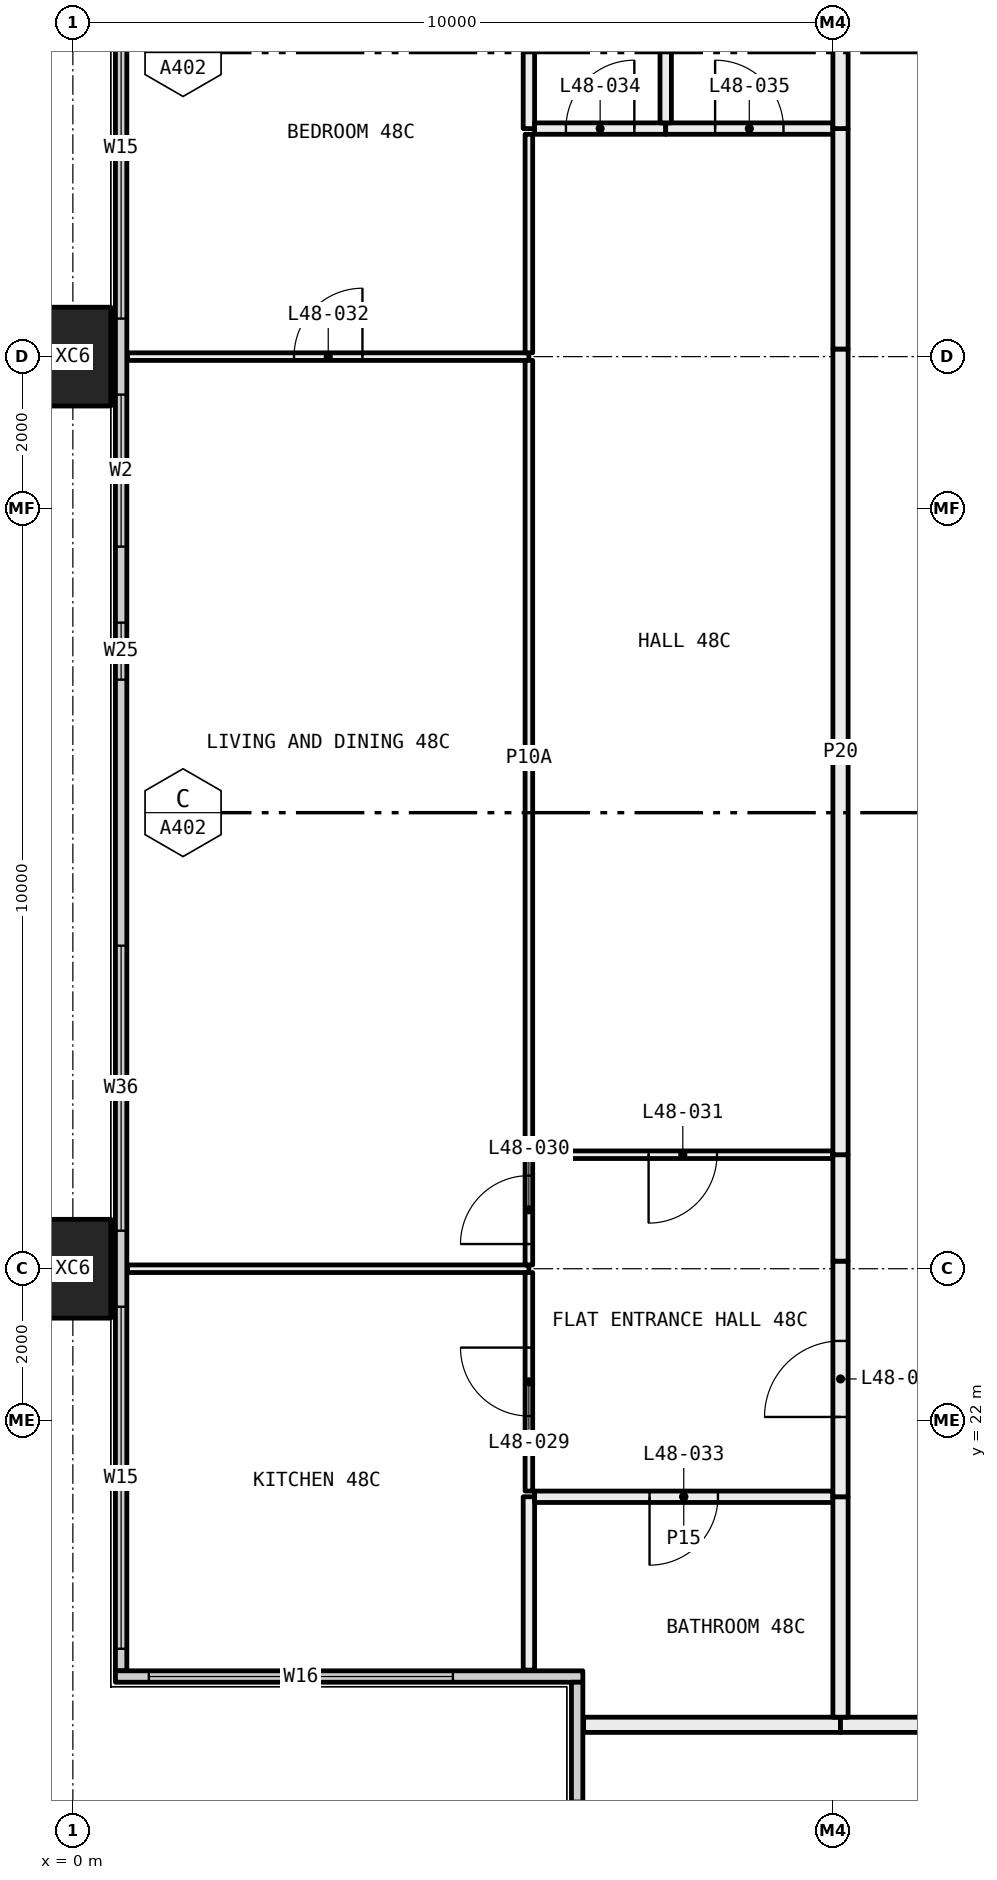
"""IFC4 building model, lengths in metres.
Left out: names, types, materials, properties, quantities, classifications, styles, units other than length and angle.
Written with IfcOpenShell. Run it as: python <this file> out.ifc"""

import sys

from ifc_helpers import new_model, si_unit, direction, frame, frame_2d, origin, origin_2d, place, context, subcontext, project, spatial, rectangle, hollow_rectangle, extrude, element, fill, save


model = new_model("IFC4")
c1 = context("Model", 3, precision=1e-05, world=origin(), true_north=direction((0.0, 1.0)))
c2 = subcontext(c1, "Body", "Model", "MODEL_VIEW")
j1 = project(units=[si_unit("LENGTHUNIT", "METRE"), si_unit("PLANEANGLEUNIT", "RADIAN")], contexts=[c1])
p1 = place(None, origin())
s1 = spatial("IfcSite", under=j1, at=p1, CompositionType="ELEMENT")
p2 = place(p1, origin())
s2 = spatial("IfcBuilding", under=s1, at=p2, CompositionType="ELEMENT")
p3 = place(p2, frame((0.0, 0.0, 182.4)))
s3 = spatial("IfcBuildingStorey", under=s2, at=p3, CompositionType="ELEMENT", Elevation=182.4)
for number, where, z_axis, x_axis in (
    (1, (0.0, 24.0, -0.4), (0.0, 0.0, 1.0), (0.0, 1.0, 0.0)),
    (2, (0.0, 36.0, -0.4), (0.0, 0.0, 1.0), (0.0, 1.0, 0.0)),
):
    element("IfcColumn", number, at=place(p3, frame(where, z_axis=z_axis, x_axis=x_axis)), inside=s3, PredefinedType="COLUMN", context=c2, shape_type="SweptSolid", body=[
        extrude(hollow_rectangle(XDim=1.3, YDim=1.0, WallThickness=0.05, at=origin_2d()), origin(), (0.0, 0.0, 1.0), 3.45),
    ])
p4 = place(p3, frame((0.635, 18.71, 0.0), z_axis=(0.0, 0.0, 1.0), x_axis=(0.0, 1.0, 0.0)))
e3 = element("IfcWall", 3, at=p4, inside=s3, PredefinedType="ELEMENTEDWALL", context=c2, shape_type="SweptSolid", body=[
    extrude(rectangle(XDim=22.58, YDim=0.15, at=frame_2d((11.29, 0.0))), origin(), (0.0, 0.0, 1.0), 3.05),
])
p5 = place(p4, frame((0.29, 0.0, 0.45)))
e4 = element("IfcOpeningElement", 4, at=p5, cuts=e3, PredefinedType="OPENING", context=c2, shape_type="SweptSolid", body=[
    extrude(rectangle(XDim=4.5, YDim=2.55, at=frame_2d((2.25, 1.275))), frame((0.0, 0.085, 0.0), z_axis=(0.0, -1.0, 0.0), x_axis=(1.0, 0.0, 0.0)), (0.0, 0.0, 1.0), 0.17),
])
p6 = place(p4, frame((5.79, 0.0, 0.45)))
e5 = element("IfcOpeningElement", 5, at=p6, cuts=e3, PredefinedType="OPENING", context=c2, shape_type="SweptSolid", body=[
    extrude(rectangle(XDim=3.75, YDim=2.55, at=frame_2d((1.875, 1.275))), frame((0.0, 0.085, 0.0), z_axis=(0.0, -1.0, 0.0), x_axis=(1.0, 0.0, 0.0)), (0.0, 0.0, 1.0), 0.17),
])
p7 = place(p4, frame((13.04, 0.0, 0.45)))
e6 = element("IfcOpeningElement", 6, at=p7, cuts=e3, PredefinedType="OPENING", context=c2, shape_type="SweptSolid", body=[
    extrude(rectangle(XDim=0.75, YDim=2.55, at=frame_2d((0.375, 1.275))), frame((0.0, 0.085, 0.0), z_axis=(0.0, -1.0, 0.0), x_axis=(1.0, 0.0, 0.0)), (0.0, 0.0, 1.0), 0.17),
])
p8 = place(p4, frame((14.79, 0.0, 0.45)))
e7 = element("IfcOpeningElement", 7, at=p8, cuts=e3, PredefinedType="OPENING", context=c2, shape_type="SweptSolid", body=[
    extrude(rectangle(XDim=2.0, YDim=2.55, at=frame_2d((1.0, 1.275))), frame((0.0, 0.085, 0.0), z_axis=(0.0, -1.0, 0.0), x_axis=(1.0, 0.0, 0.0)), (0.0, 0.0, 1.0), 0.17),
])
p9 = place(p4, frame((17.79, 0.0, 0.45)))
e8 = element("IfcOpeningElement", 8, at=p9, cuts=e3, PredefinedType="OPENING", context=c2, shape_type="SweptSolid", body=[
    extrude(rectangle(XDim=4.5, YDim=2.55, at=frame_2d((2.25, 1.275))), frame((0.0, 0.085, 0.0), z_axis=(0.0, -1.0, 0.0), x_axis=(1.0, 0.0, 0.0)), (0.0, 0.0, 1.0), 0.17),
])
p10 = place(p3, frame((0.56, 18.635, 0.0), z_axis=(0.0, 0.0, 1.0), x_axis=(1.0, 0.0, 0.0)))
e9 = element("IfcWall", 9, at=p10, inside=s3, PredefinedType="ELEMENTEDWALL", context=c2, shape_type="SweptSolid", body=[
    extrude(rectangle(XDim=6.15, YDim=0.15, at=frame_2d((3.075, 0.0))), origin(), (0.0, 0.0, 1.0), 3.05),
])
p11 = place(p10, frame((0.44, 0.0, 0.45)))
e10 = element("IfcOpeningElement", 10, at=p11, cuts=e9, PredefinedType="OPENING", context=c2, shape_type="SweptSolid", body=[
    extrude(rectangle(XDim=4.0, YDim=2.55, at=frame_2d((2.0, 1.275))), frame((0.0, 0.085, 0.0), z_axis=(0.0, -1.0, 0.0), x_axis=(1.0, 0.0, 0.0)), (0.0, 0.0, 1.0), 0.17),
])
p12 = place(p3, frame((6.635, 12.71, 0.0), z_axis=(0.0, 0.0, 1.0), x_axis=(0.0, 1.0, 0.0)))
e11 = element("IfcWall", 11, at=p12, inside=s3, PredefinedType="ELEMENTEDWALL", context=c2, shape_type="SweptSolid", body=[
    extrude(rectangle(XDim=5.85, YDim=0.15, at=frame_2d((2.925, 0.0))), origin(), (0.0, 0.0, 1.0), 3.05),
])
p13 = place(p12, frame((0.29, 0.0, 0.45)))
e12 = element("IfcOpeningElement", 12, at=p13, cuts=e11, PredefinedType="OPENING", context=c2, shape_type="SweptSolid", body=[
    extrude(rectangle(XDim=4.0, YDim=2.55, at=frame_2d((2.0, 1.275))), frame((0.0, 0.085, 0.0), z_axis=(0.0, -1.0, 0.0), x_axis=(1.0, 0.0, 0.0)), (0.0, 0.0, 1.0), 0.17),
])
p14 = place(p3, frame((10.1, 18.0, 0.0), z_axis=(0.0, 0.0, 1.0), x_axis=(-1.0, 0.0, 0.0)))
e13 = element("IfcWall", 13, at=p14, inside=s3, PredefinedType="PARTITIONING", context=c2, shape_type="SweptSolid", body=[
    extrude(rectangle(XDim=3.38, YDim=0.2, at=frame_2d((1.69, 0.0))), origin(), (0.0, 0.0, 1.0), 3.05),
])
p15 = place(p3, frame((12.0, 18.0, 0.0), z_axis=(0.0, 0.0, 1.0), x_axis=(-1.0, 0.0, 0.0)))
e14 = element("IfcWall", 14, at=p15, inside=s3, PredefinedType="PARTITIONING", context=c2, shape_type="SweptSolid", body=[
    extrude(rectangle(XDim=1.9, YDim=0.2, at=frame_2d((0.95, 0.0))), origin(), (0.0, 0.0, 1.0), 3.05),
])
p16 = place(p3, frame((6.0, 24.0, 0.0), z_axis=(0.0, 0.0, 1.0), x_axis=(-1.0, 0.0, 0.0)))
e15 = element("IfcWall", 15, at=p16, inside=s3, PredefinedType="PARTITIONING", context=c2, shape_type="SweptSolid", body=[
    extrude(rectangle(XDim=5.28, YDim=0.1, at=frame_2d((2.64, 0.0))), origin(), (0.0, 0.0, 1.0), 2.45),
])
p17 = place(p3, frame((6.0, 18.72, 0.0), z_axis=(0.0, 0.0, 1.0), x_axis=(0.0, 1.0, 0.0)))
e16 = element("IfcWall", 16, at=p17, inside=s3, PredefinedType="PARTITIONING", context=c2, shape_type="SweptSolid", body=[
    extrude(rectangle(XDim=2.28, YDim=0.15, at=frame_2d((1.14, 0.0))), origin(), (0.0, 0.0, 1.0), 3.05),
])
p18 = place(p3, frame((6.0, 21.075, 0.0), z_axis=(0.0, 0.0, 1.0), x_axis=(0.0, 1.0, 0.0)))
e17 = element("IfcWall", 17, at=p18, inside=s3, PredefinedType="PARTITIONING", context=c2, shape_type="SweptSolid", body=[
    extrude(rectangle(XDim=2.875, YDim=0.1, at=frame_2d((1.438, 0.0))), origin(), (0.0, 0.0, 1.0), 2.45),
])
p19 = place(p18, frame((0.988, 0.0, 0.0)))
e18 = element("IfcOpeningElement", 18, at=p19, cuts=e17, PredefinedType="OPENING", context=c2, shape_type="SweptSolid", body=[
    extrude(rectangle(XDim=0.9, YDim=2.1, at=frame_2d((0.45, 1.05))), frame((0.0, 0.06, 0.0), z_axis=(0.0, -1.0, 0.0), x_axis=(1.0, 0.0, 0.0)), (0.0, 0.0, 1.0), 0.12),
])
p20 = place(p3, frame((6.0, 36.0, 0.0), z_axis=(0.0, 0.0, 1.0), x_axis=(-1.0, 0.0, 0.0)))
e19 = element("IfcWall", 19, at=p20, inside=s3, PredefinedType="PARTITIONING", context=c2, shape_type="SweptSolid", body=[
    extrude(rectangle(XDim=5.28, YDim=0.1, at=frame_2d((2.64, 0.0))), origin(), (0.0, 0.0, 1.0), 2.45),
])
p21 = place(p20, frame((2.19, 0.0, 0.0)))
e20 = element("IfcOpeningElement", 20, at=p21, cuts=e19, PredefinedType="OPENING", context=c2, shape_type="SweptSolid", body=[
    extrude(rectangle(XDim=0.9, YDim=2.1, at=frame_2d((0.45, 1.05))), frame((0.0, 0.06, 0.0), z_axis=(0.0, -1.0, 0.0), x_axis=(1.0, 0.0, 0.0)), (0.0, 0.0, 1.0), 0.12),
])
p22 = place(p3, frame((6.0, 24.05, 0.0), z_axis=(0.0, 0.0, 1.0), x_axis=(0.0, 1.0, 0.0)))
e21 = element("IfcWall", 21, at=p22, inside=s3, PredefinedType="PARTITIONING", context=c2, shape_type="SweptSolid", body=[
    extrude(rectangle(XDim=1.45, YDim=0.1, at=frame_2d((0.725, 0.0))), origin(), (0.0, 0.0, 1.0), 2.45),
])
p23 = place(p22, frame((0.275, 0.0, 0.0)))
e22 = element("IfcOpeningElement", 22, at=p23, cuts=e21, PredefinedType="OPENING", context=c2, shape_type="SweptSolid", body=[
    extrude(rectangle(XDim=0.9, YDim=2.1, at=frame_2d((0.45, 1.05))), frame((0.0, 0.06, 0.0), z_axis=(0.0, -1.0, 0.0), x_axis=(1.0, 0.0, 0.0)), (0.0, 0.0, 1.0), 0.12),
])
p24 = place(p3, frame((6.0, 25.5, 0.0), z_axis=(0.0, 0.0, 1.0), x_axis=(0.0, 1.0, 0.0)))
e23 = element("IfcWall", 23, at=p24, inside=s3, PredefinedType="PARTITIONING", context=c2, shape_type="SweptSolid", body=[
    extrude(rectangle(XDim=10.45, YDim=0.1, at=frame_2d((5.225, 0.0))), origin(), (0.0, 0.0, 1.0), 2.45),
])
p25 = place(p3, frame((6.0, 36.05, 0.0), z_axis=(0.0, 0.0, 1.0), x_axis=(0.0, 1.0, 0.0)))
e24 = element("IfcWall", 24, at=p25, inside=s3, PredefinedType="PARTITIONING", context=c2, shape_type="SweptSolid", body=[
    extrude(rectangle(XDim=2.875, YDim=0.1, at=frame_2d((1.438, 0.0))), origin(), (0.0, 0.0, 1.0), 2.45),
])
p26 = place(p3, frame((6.0, 39.0, 0.0), z_axis=(0.0, 0.0, 1.0), x_axis=(0.0, 1.0, 0.0)))
e25 = element("IfcWall", 25, at=p26, inside=s3, PredefinedType="PARTITIONING", context=c2, shape_type="SweptSolid", body=[
    extrude(rectangle(XDim=2.28, YDim=0.15, at=frame_2d((1.14, 0.0))), origin(), (0.0, 0.0, 1.0), 3.05),
])
p27 = place(p3, frame((10.0, 21.0, 0.0), z_axis=(0.0, 0.0, 1.0), x_axis=(-1.0, 0.0, 0.0)))
e26 = element("IfcWall", 26, at=p27, inside=s3, PredefinedType="PARTITIONING", context=c2, shape_type="SweptSolid", body=[
    extrude(rectangle(XDim=3.925, YDim=0.15, at=frame_2d((1.962, 0.0))), origin(), (0.0, 0.0, 1.0), 3.05),
])
p28 = place(p27, frame((1.512, 0.0, 0.0)))
e27 = element("IfcOpeningElement", 27, at=p28, cuts=e26, PredefinedType="OPENING", context=c2, shape_type="SweptSolid", body=[
    extrude(rectangle(XDim=0.9, YDim=2.1, at=frame_2d((0.45, 1.05))), frame((0.0, 0.085, 0.0), z_axis=(0.0, -1.0, 0.0), x_axis=(1.0, 0.0, 0.0)), (0.0, 0.0, 1.0), 0.17),
])
p29 = place(p3, frame((10.1, 18.1, 0.0), z_axis=(0.0, 0.0, 1.0), x_axis=(0.0, 1.0, 0.0)))
e28 = element("IfcWall", 28, at=p29, inside=s3, PredefinedType="PARTITIONING", context=c2, shape_type="SweptSolid", body=[
    extrude(rectangle(XDim=2.9, YDim=0.2, at=frame_2d((1.45, 0.0))), origin(), (0.0, 0.0, 1.0), 3.05),
])
p30 = place(p3, frame((10.0, 25.5, 0.0), z_axis=(0.0, 0.0, 1.0), x_axis=(-1.0, 0.0, 0.0)))
e29 = element("IfcWall", 29, at=p30, inside=s3, PredefinedType="PARTITIONING", context=c2, shape_type="SweptSolid", body=[
    extrude(rectangle(XDim=3.95, YDim=0.1, at=frame_2d((1.975, 0.0))), origin(), (0.0, 0.0, 1.0), 3.05),
])
p31 = place(p30, frame((1.525, 0.0, 0.0)))
e30 = element("IfcOpeningElement", 30, at=p31, cuts=e29, PredefinedType="OPENING", context=c2, shape_type="SweptSolid", body=[
    extrude(rectangle(XDim=0.9, YDim=2.1, at=frame_2d((0.45, 1.05))), frame((0.0, 0.06, 0.0), z_axis=(0.0, -1.0, 0.0), x_axis=(1.0, 0.0, 0.0)), (0.0, 0.0, 1.0), 0.12),
])
p32 = place(p3, frame((10.1, 21.0, 0.0), z_axis=(0.0, 0.0, 1.0), x_axis=(0.0, 1.0, 0.0)))
e31 = element("IfcWall", 31, at=p32, inside=s3, PredefinedType="PARTITIONING", context=c2, shape_type="SweptSolid", body=[
    extrude(rectangle(XDim=3.1, YDim=0.2, at=frame_2d((1.55, 0.0))), origin(), (0.0, 0.0, 1.0), 2.45),
])
p33 = place(p32, frame((1.05, 0.0, 0.0)))
e32 = element("IfcOpeningElement", 32, at=p33, cuts=e31, PredefinedType="OPENING", context=c2, shape_type="SweptSolid", body=[
    extrude(rectangle(XDim=1.0, YDim=2.1, at=frame_2d((0.5, 1.05))), frame((0.0, 0.11, 0.0), z_axis=(0.0, -1.0, 0.0), x_axis=(1.0, 0.0, 0.0)), (0.0, 0.0, 1.0), 0.22),
])
p34 = place(p3, frame((10.1, 24.1, 0.0), z_axis=(0.0, 0.0, 1.0), x_axis=(0.0, 1.0, 0.0)))
e33 = element("IfcWall", 33, at=p34, inside=s3, PredefinedType="PARTITIONING", context=c2, shape_type="SweptSolid", body=[
    extrude(rectangle(XDim=1.4, YDim=0.2, at=frame_2d((0.7, 0.0))), origin(), (0.0, 0.0, 1.0), 3.05),
])
p35 = place(p3, frame((7.8, 39.0, 0.0), z_axis=(0.0, 0.0, 1.0), x_axis=(-1.0, 0.0, 0.0)))
e34 = element("IfcWall", 34, at=p35, inside=s3, PredefinedType="PARTITIONING", context=c2, shape_type="SweptSolid", body=[
    extrude(rectangle(XDim=1.725, YDim=0.15, at=frame_2d((0.863, 0.0))), origin(), (0.0, 0.0, 1.0), 3.05),
])
p36 = place(p35, frame((0.413, 0.0, 0.0)))
e35 = element("IfcOpeningElement", 35, at=p36, cuts=e34, PredefinedType="OPENING", context=c2, shape_type="SweptSolid", body=[
    extrude(rectangle(XDim=0.9, YDim=2.1, at=frame_2d((0.45, 1.05))), frame((0.0, 0.085, 0.0), z_axis=(0.0, -1.0, 0.0), x_axis=(1.0, 0.0, 0.0)), (0.0, 0.0, 1.0), 0.17),
])
p37 = place(p3, frame((10.0, 39.0, 0.0), z_axis=(0.0, 0.0, 1.0), x_axis=(-1.0, 0.0, 0.0)))
e36 = element("IfcWall", 36, at=p37, inside=s3, PredefinedType="PARTITIONING", context=c2, shape_type="SweptSolid", body=[
    extrude(rectangle(XDim=2.2, YDim=0.15, at=frame_2d((1.1, 0.0))), origin(), (0.0, 0.0, 1.0), 3.05),
])
p38 = place(p37, frame((0.65, 0.0, 0.0)))
e37 = element("IfcOpeningElement", 37, at=p38, cuts=e36, PredefinedType="OPENING", context=c2, shape_type="SweptSolid", body=[
    extrude(rectangle(XDim=0.9, YDim=2.1, at=frame_2d((0.45, 1.05))), frame((0.0, 0.085, 0.0), z_axis=(0.0, -1.0, 0.0), x_axis=(1.0, 0.0, 0.0)), (0.0, 0.0, 1.0), 0.17),
])
p39 = place(p3, frame((10.1, 25.5, 0.0), z_axis=(0.0, 0.0, 1.0), x_axis=(0.0, 1.0, 0.0)))
e38 = element("IfcWall", 38, at=p39, inside=s3, PredefinedType="PARTITIONING", context=c2, shape_type="SweptSolid", body=[
    extrude(rectangle(XDim=10.6, YDim=0.2, at=frame_2d((5.3, 0.0))), origin(), (0.0, 0.0, 1.0), 2.45),
])
p40 = place(p3, frame((10.1, 36.1, 0.0), z_axis=(0.0, 0.0, 1.0), x_axis=(0.0, 1.0, 0.0)))
e39 = element("IfcWall", 39, at=p40, inside=s3, PredefinedType="PARTITIONING", context=c2, shape_type="SweptSolid", body=[
    extrude(rectangle(XDim=2.9, YDim=0.2, at=frame_2d((1.45, 0.0))), origin(), (0.0, 0.0, 1.0), 3.05),
])
p41 = place(p3, frame((7.8, 39.075, 0.0), z_axis=(0.0, 0.0, 1.0), x_axis=(0.0, 1.0, 0.0)))
e40 = element("IfcWall", 40, at=p41, inside=s3, PredefinedType="PARTITIONING", context=c2, shape_type="SweptSolid", body=[
    extrude(rectangle(XDim=2.825, YDim=0.15, at=frame_2d((1.413, 0.0))), origin(), (0.0, 0.0, 1.0), 3.05),
])
p42 = place(p3, frame((10.1, 39.0, 0.0), z_axis=(0.0, 0.0, 1.0), x_axis=(0.0, 1.0, 0.0)))
e41 = element("IfcWall", 41, at=p42, inside=s3, PredefinedType="PARTITIONING", context=c2, shape_type="SweptSolid", body=[
    extrude(rectangle(XDim=2.9, YDim=0.2, at=frame_2d((1.45, 0.0))), origin(), (0.0, 0.0, 1.0), 3.05),
])
p43 = place(p5, origin())
e42 = element("IfcWindow", 42, at=p43, inside=s3, PartitioningType="SINGLE_PANEL", PredefinedType="WINDOW", context=c2, shape_type="SweptSolid", body=[
    extrude(rectangle(XDim=4.5, YDim=2.55, at=frame_2d((2.25, 1.275))), frame((0.0, 0.03, 0.0), z_axis=(0.0, -1.0, 0.0), x_axis=(1.0, 0.0, 0.0)), (0.0, 0.0, 1.0), 0.06),
])
fill(e4, e42)
p44 = place(p6, origin())
e43 = element("IfcWindow", 43, at=p44, inside=s3, PartitioningType="SINGLE_PANEL", PredefinedType="WINDOW", context=c2, shape_type="SweptSolid", body=[
    extrude(rectangle(XDim=3.75, YDim=2.55, at=frame_2d((1.875, 1.275))), frame((0.0, 0.03, 0.0), z_axis=(0.0, -1.0, 0.0), x_axis=(1.0, 0.0, 0.0)), (0.0, 0.0, 1.0), 0.06),
])
fill(e5, e43)
p45 = place(p7, origin())
e44 = element("IfcWindow", 44, at=p45, inside=s3, PartitioningType="SINGLE_PANEL", PredefinedType="WINDOW", context=c2, shape_type="SweptSolid", body=[
    extrude(rectangle(XDim=0.75, YDim=2.55, at=frame_2d((0.375, 1.275))), frame((0.0, 0.03, 0.0), z_axis=(0.0, -1.0, 0.0), x_axis=(1.0, 0.0, 0.0)), (0.0, 0.0, 1.0), 0.06),
])
fill(e6, e44)
p46 = place(p8, origin())
e45 = element("IfcWindow", 45, at=p46, inside=s3, PartitioningType="SINGLE_PANEL", PredefinedType="WINDOW", context=c2, shape_type="SweptSolid", body=[
    extrude(rectangle(XDim=2.0, YDim=2.55, at=frame_2d((1.0, 1.275))), frame((0.0, 0.03, 0.0), z_axis=(0.0, -1.0, 0.0), x_axis=(1.0, 0.0, 0.0)), (0.0, 0.0, 1.0), 0.06),
])
fill(e7, e45)
p47 = place(p9, origin())
e46 = element("IfcWindow", 46, at=p47, inside=s3, PartitioningType="SINGLE_PANEL", PredefinedType="WINDOW", context=c2, shape_type="SweptSolid", body=[
    extrude(rectangle(XDim=4.5, YDim=2.55, at=frame_2d((2.25, 1.275))), frame((0.0, 0.03, 0.0), z_axis=(0.0, -1.0, 0.0), x_axis=(1.0, 0.0, 0.0)), (0.0, 0.0, 1.0), 0.06),
])
fill(e8, e46)
p48 = place(p11, origin())
e47 = element("IfcWindow", 47, at=p48, inside=s3, PartitioningType="SINGLE_PANEL", PredefinedType="WINDOW", context=c2, shape_type="SweptSolid", body=[
    extrude(rectangle(XDim=4.0, YDim=2.55, at=frame_2d((2.0, 1.275))), frame((0.0, 0.03, 0.0), z_axis=(0.0, -1.0, 0.0), x_axis=(1.0, 0.0, 0.0)), (0.0, 0.0, 1.0), 0.06),
])
fill(e10, e47)
p49 = place(p33, origin())
e48 = element("IfcDoor", 48, at=p49, inside=s3, OperationType="SINGLE_SWING_RIGHT", PredefinedType="DOOR", context=c2, shape_type="SweptSolid", body=[
    extrude(rectangle(XDim=1.0, YDim=2.1, at=frame_2d((0.5, 1.05))), frame((0.0, 0.025, 0.0), z_axis=(0.0, -1.0, 0.0), x_axis=(1.0, 0.0, 0.0)), (0.0, 0.0, 1.0), 0.05),
])
fill(e32, e48)
p50 = place(p19, origin())
e49 = element("IfcDoor", 49, at=p50, inside=s3, OperationType="SINGLE_SWING_LEFT", PredefinedType="DOOR", context=c2, shape_type="SweptSolid", body=[
    extrude(rectangle(XDim=0.9, YDim=2.1, at=frame_2d((0.45, 1.05))), frame((0.0, 0.025, 0.0), z_axis=(0.0, -1.0, 0.0), x_axis=(1.0, 0.0, 0.0)), (0.0, 0.0, 1.0), 0.05),
])
fill(e18, e49)
p51 = place(p23, origin())
e50 = element("IfcDoor", 50, at=p51, inside=s3, OperationType="SINGLE_SWING_RIGHT", PredefinedType="DOOR", context=c2, shape_type="SweptSolid", body=[
    extrude(rectangle(XDim=0.9, YDim=2.1, at=frame_2d((0.45, 1.05))), frame((0.0, 0.025, 0.0), z_axis=(0.0, -1.0, 0.0), x_axis=(1.0, 0.0, 0.0)), (0.0, 0.0, 1.0), 0.05),
])
fill(e22, e50)
p52 = place(p31, origin())
e51 = element("IfcDoor", 51, at=p52, inside=s3, OperationType="SINGLE_SWING_LEFT", PredefinedType="DOOR", context=c2, shape_type="SweptSolid", body=[
    extrude(rectangle(XDim=0.9, YDim=2.1, at=frame_2d((0.45, 1.05))), frame((0.0, 0.025, 0.0), z_axis=(0.0, -1.0, 0.0), x_axis=(1.0, 0.0, 0.0)), (0.0, 0.0, 1.0), 0.05),
])
fill(e30, e51)
p53 = place(p21, frame((0.9, 0.0, 0.0), x_axis=(-1.0, 0.0, 0.0)))
e52 = element("IfcDoor", 52, at=p53, inside=s3, OperationType="SINGLE_SWING_LEFT", PredefinedType="DOOR", context=c2, shape_type="SweptSolid", body=[
    extrude(rectangle(XDim=0.9, YDim=2.1, at=frame_2d((0.45, 1.05))), frame((0.0, 0.025, 0.0), z_axis=(0.0, -1.0, 0.0), x_axis=(1.0, 0.0, 0.0)), (0.0, 0.0, 1.0), 0.05),
])
fill(e20, e52)
p54 = place(p28, origin())
e53 = element("IfcDoor", 53, at=p54, inside=s3, OperationType="SINGLE_SWING_LEFT", PredefinedType="DOOR", context=c2, shape_type="SweptSolid", body=[
    extrude(rectangle(XDim=0.9, YDim=2.1, at=frame_2d((0.45, 1.05))), frame((0.0, 0.025, 0.0), z_axis=(0.0, -1.0, 0.0), x_axis=(1.0, 0.0, 0.0)), (0.0, 0.0, 1.0), 0.05),
])
fill(e27, e53)
p55 = place(p36, frame((0.9, 0.0, 0.0), x_axis=(-1.0, 0.0, 0.0)))
e54 = element("IfcDoor", 54, at=p55, inside=s3, OperationType="SINGLE_SWING_LEFT", PredefinedType="DOOR", context=c2, shape_type="SweptSolid", body=[
    extrude(rectangle(XDim=0.9, YDim=2.1, at=frame_2d((0.45, 1.05))), frame((0.0, 0.025, 0.0), z_axis=(0.0, -1.0, 0.0), x_axis=(1.0, 0.0, 0.0)), (0.0, 0.0, 1.0), 0.05),
])
fill(e35, e54)
p56 = place(p38, frame((0.9, 0.0, 0.0), x_axis=(-1.0, 0.0, 0.0)))
e55 = element("IfcDoor", 55, at=p56, inside=s3, OperationType="SINGLE_SWING_RIGHT", PredefinedType="DOOR", context=c2, shape_type="SweptSolid", body=[
    extrude(rectangle(XDim=0.9, YDim=2.1, at=frame_2d((0.45, 1.05))), frame((0.0, 0.025, 0.0), z_axis=(0.0, -1.0, 0.0), x_axis=(1.0, 0.0, 0.0)), (0.0, 0.0, 1.0), 0.05),
])
fill(e37, e55)
save(model, sys.argv[1])
